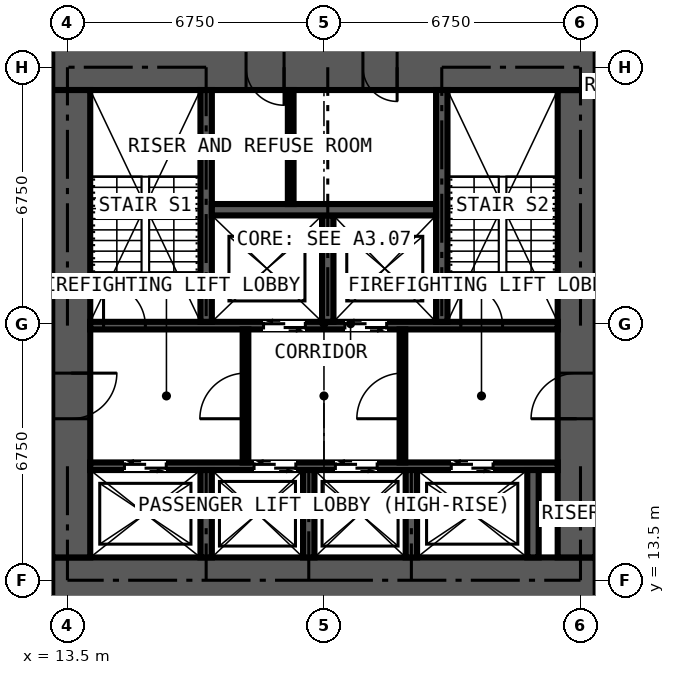
"""IFC4 building model, lengths in metres.
Left out: names, types, materials, properties, quantities, classifications, styles, units other than length and angle.
Written with IfcOpenShell. Run it as: python <this file> out.ifc"""

import sys

from ifc_helpers import new_model, si_unit, direction, frame, frame_2d, origin, place, context, subcontext, project, spatial, rectangle, extrude, element, fill, save


model = new_model("IFC4")
c1 = context("Model", 3, precision=1e-05, world=origin(), true_north=direction((0.0, 1.0)))
c2 = subcontext(c1, "Body", "Model", "MODEL_VIEW")
j1 = project(units=[si_unit("LENGTHUNIT", "METRE"), si_unit("PLANEANGLEUNIT", "RADIAN")], contexts=[c1])
p1 = place(None, origin())
s1 = spatial("IfcSite", under=j1, at=p1, CompositionType="ELEMENT")
p2 = place(p1, origin())
s2 = spatial("IfcBuilding", under=s1, at=p2, CompositionType="ELEMENT")
p3 = place(p2, frame((0.0, 0.0, 181.8)))
s3 = spatial("IfcBuildingStorey", under=s2, at=p3, CompositionType="ELEMENT", Elevation=181.8)
p4 = place(p3, frame((13.1, 13.5, 0.0), z_axis=(0.0, 0.0, 1.0), x_axis=(1.0, 0.0, 0.0)))
e1 = element("IfcWall", 1, at=p4, inside=s3, PredefinedType="SHEAR", context=c2, shape_type="SweptSolid", body=[
    extrude(rectangle(XDim=14.3, YDim=1.2, at=frame_2d((7.15, 0.0))), origin(), (0.0, 0.0, 1.0), 3.6),
])
p5 = place(p3, frame((26.9, 14.1, 0.0), z_axis=(0.0, 0.0, 1.0), x_axis=(0.0, 1.0, 0.0)))
e2 = element("IfcWall", 2, at=p5, inside=s3, PredefinedType="SHEAR", context=c2, shape_type="SweptSolid", body=[
    extrude(rectangle(XDim=12.3, YDim=1.0, at=frame_2d((6.15, 0.0))), origin(), (0.0, 0.0, 1.0), 3.6),
])
p6 = place(p5, frame((3.65, 0.0, 0.0)))
e3 = element("IfcOpeningElement", 3, at=p6, cuts=e2, PredefinedType="OPENING", context=c2, shape_type="SweptSolid", body=[
    extrude(rectangle(XDim=1.2, YDim=2.2, at=frame_2d((0.6, 1.1))), frame((0.0, 0.51, 0.0), z_axis=(0.0, -1.0, 0.0), x_axis=(1.0, 0.0, 0.0)), (0.0, 0.0, 1.0), 1.02),
])
p7 = place(p3, frame((27.4, 27.0, 0.0), z_axis=(0.0, 0.0, 1.0), x_axis=(-1.0, 0.0, 0.0)))
e4 = element("IfcWall", 4, at=p7, inside=s3, PredefinedType="SHEAR", context=c2, shape_type="SweptSolid", body=[
    extrude(rectangle(XDim=14.3, YDim=1.2, at=frame_2d((7.15, 0.0))), origin(), (0.0, 0.0, 1.0), 3.6),
])
p8 = place(p7, frame((5.225, 0.0, 0.0)))
e5 = element("IfcOpeningElement", 5, at=p8, cuts=e4, PredefinedType="OPENING", context=c2, shape_type="SweptSolid", body=[
    extrude(rectangle(XDim=0.9, YDim=2.2, at=frame_2d((0.45, 1.1))), frame((0.0, 0.61, 0.0), z_axis=(0.0, -1.0, 0.0), x_axis=(1.0, 0.0, 0.0)), (0.0, 0.0, 1.0), 1.22),
])
p9 = place(p7, frame((8.2, 0.0, 0.0)))
e6 = element("IfcOpeningElement", 6, at=p9, cuts=e4, PredefinedType="OPENING", context=c2, shape_type="SweptSolid", body=[
    extrude(rectangle(XDim=1.0, YDim=2.2, at=frame_2d((0.5, 1.1))), frame((0.0, 0.61, 0.0), z_axis=(0.0, -1.0, 0.0), x_axis=(1.0, 0.0, 0.0)), (0.0, 0.0, 1.0), 1.22),
])
p10 = place(p3, frame((13.6, 26.4, 0.0), z_axis=(0.0, 0.0, 1.0), x_axis=(0.0, -1.0, 0.0)))
e7 = element("IfcWall", 7, at=p10, inside=s3, PredefinedType="SHEAR", context=c2, shape_type="SweptSolid", body=[
    extrude(rectangle(XDim=12.3, YDim=1.0, at=frame_2d((6.15, 0.0))), origin(), (0.0, 0.0, 1.0), 3.6),
])
p11 = place(p10, frame((7.45, 0.0, 0.0)))
e8 = element("IfcOpeningElement", 8, at=p11, cuts=e7, PredefinedType="OPENING", context=c2, shape_type="SweptSolid", body=[
    extrude(rectangle(XDim=1.2, YDim=2.2, at=frame_2d((0.6, 1.1))), frame((0.0, 0.51, 0.0), z_axis=(0.0, -1.0, 0.0), x_axis=(1.0, 0.0, 0.0)), (0.0, 0.0, 1.0), 1.02),
])
p12 = place(p3, frame((14.1, 16.5, 0.0), z_axis=(0.0, 0.0, 1.0), x_axis=(1.0, 0.0, 0.0)))
e9 = element("IfcWall", 9, at=p12, inside=s3, PredefinedType="SHEAR", context=c2, shape_type="SweptSolid", body=[
    extrude(rectangle(XDim=12.3, YDim=0.2, at=frame_2d((6.15, 0.0))), origin(), (0.0, 0.0, 1.0), 3.6),
])
p13 = place(p12, frame((0.9, 0.0, 0.0)))
e10 = element("IfcOpeningElement", 10, at=p13, cuts=e9, PredefinedType="OPENING", context=c2, shape_type="SweptSolid", body=[
    extrude(rectangle(XDim=1.1, YDim=2.2, at=frame_2d((0.55, 1.1))), frame((0.0, 0.11, 0.0), z_axis=(0.0, -1.0, 0.0), x_axis=(1.0, 0.0, 0.0)), (0.0, 0.0, 1.0), 0.22),
])
p14 = place(p12, frame((4.31, 0.0, 0.0)))
e11 = element("IfcOpeningElement", 11, at=p14, cuts=e9, PredefinedType="OPENING", context=c2, shape_type="SweptSolid", body=[
    extrude(rectangle(XDim=1.1, YDim=2.2, at=frame_2d((0.55, 1.1))), frame((0.0, 0.11, 0.0), z_axis=(0.0, -1.0, 0.0), x_axis=(1.0, 0.0, 0.0)), (0.0, 0.0, 1.0), 0.22),
])
p15 = place(p12, frame((6.45, 0.0, 0.0)))
e12 = element("IfcOpeningElement", 12, at=p15, cuts=e9, PredefinedType="OPENING", context=c2, shape_type="SweptSolid", body=[
    extrude(rectangle(XDim=1.1, YDim=2.2, at=frame_2d((0.55, 1.1))), frame((0.0, 0.11, 0.0), z_axis=(0.0, -1.0, 0.0), x_axis=(1.0, 0.0, 0.0)), (0.0, 0.0, 1.0), 0.22),
])
p16 = place(p12, frame((9.5, 0.0, 0.0)))
e13 = element("IfcOpeningElement", 13, at=p16, cuts=e9, PredefinedType="OPENING", context=c2, shape_type="SweptSolid", body=[
    extrude(rectangle(XDim=1.1, YDim=2.2, at=frame_2d((0.55, 1.1))), frame((0.0, 0.11, 0.0), z_axis=(0.0, -1.0, 0.0), x_axis=(1.0, 0.0, 0.0)), (0.0, 0.0, 1.0), 0.22),
])
p17 = place(p3, frame((14.1, 20.2, 0.0), z_axis=(0.0, 0.0, 1.0), x_axis=(1.0, 0.0, 0.0)))
e14 = element("IfcWall", 14, at=p17, inside=s3, PredefinedType="SHEAR", context=c2, shape_type="SweptSolid", body=[
    extrude(rectangle(XDim=12.3, YDim=0.2, at=frame_2d((6.15, 0.0))), origin(), (0.0, 0.0, 1.0), 3.6),
])
p18 = place(p17, frame((4.56, 0.0, 0.0)))
e15 = element("IfcOpeningElement", 15, at=p18, cuts=e14, PredefinedType="OPENING", context=c2, shape_type="SweptSolid", body=[
    extrude(rectangle(XDim=1.1, YDim=2.2, at=frame_2d((0.55, 1.1))), frame((0.0, 0.11, 0.0), z_axis=(0.0, -1.0, 0.0), x_axis=(1.0, 0.0, 0.0)), (0.0, 0.0, 1.0), 0.22),
])
p19 = place(p17, frame((6.7, 0.0, 0.0)))
e16 = element("IfcOpeningElement", 16, at=p19, cuts=e14, PredefinedType="OPENING", context=c2, shape_type="SweptSolid", body=[
    extrude(rectangle(XDim=1.1, YDim=2.2, at=frame_2d((0.55, 1.1))), frame((0.0, 0.11, 0.0), z_axis=(0.0, -1.0, 0.0), x_axis=(1.0, 0.0, 0.0)), (0.0, 0.0, 1.0), 0.22),
])
p20 = place(p17, frame((0.35, 0.0, 0.0)))
e17 = element("IfcOpeningElement", 17, at=p20, cuts=e14, PredefinedType="OPENING", context=c2, shape_type="SweptSolid", body=[
    extrude(rectangle(XDim=1.1, YDim=2.2, at=frame_2d((0.55, 1.1))), frame((0.0, 0.11, 0.0), z_axis=(0.0, -1.0, 0.0), x_axis=(1.0, 0.0, 0.0)), (0.0, 0.0, 1.0), 0.22),
])
p21 = place(p17, frame((9.75, 0.0, 0.0)))
e18 = element("IfcOpeningElement", 18, at=p21, cuts=e14, PredefinedType="OPENING", context=c2, shape_type="SweptSolid", body=[
    extrude(rectangle(XDim=1.1, YDim=2.2, at=frame_2d((0.55, 1.1))), frame((0.0, 0.11, 0.0), z_axis=(0.0, -1.0, 0.0), x_axis=(1.0, 0.0, 0.0)), (0.0, 0.0, 1.0), 0.22),
])
for number, where, z_axis, x_axis in (
    (19, (17.15, 20.3, 0.0), (0.0, 0.0, 1.0), (0.0, 1.0, 0.0)),
    (20, (23.35, 20.3, 0.0), (0.0, 0.0, 1.0), (0.0, 1.0, 0.0)),
):
    element("IfcWall", number, at=place(p3, frame(where, z_axis=z_axis, x_axis=x_axis)), inside=s3, PredefinedType="SHEAR", context=c2, shape_type="SweptSolid", body=[
        extrude(rectangle(XDim=6.1, YDim=0.3, at=frame_2d((3.05, 0.0))), origin(), (0.0, 0.0, 1.0), 3.6),
    ])
p22 = place(p3, frame((20.35, 20.3, 0.0), z_axis=(0.0, 0.0, 1.0), x_axis=(0.0, 1.0, 0.0)))
e21 = element("IfcWall", 21, at=p22, inside=s3, PredefinedType="SHEAR", context=c2, shape_type="SweptSolid", body=[
    extrude(rectangle(XDim=2.8, YDim=0.3, at=frame_2d((1.4, 0.0))), origin(), (0.0, 0.0, 1.0), 3.6),
])
p23 = place(p3, frame((17.3, 23.25, 0.0), z_axis=(0.0, 0.0, 1.0), x_axis=(1.0, 0.0, 0.0)))
e22 = element("IfcWall", 22, at=p23, inside=s3, PredefinedType="SHEAR", context=c2, shape_type="SweptSolid", body=[
    extrude(rectangle(XDim=5.9, YDim=0.3, at=frame_2d((2.95, 0.0))), origin(), (0.0, 0.0, 1.0), 3.6),
])
for number, where, z_axis, x_axis in (
    (23, (17.15, 14.1, 0.0), (0.0, 0.0, 1.0), (0.0, 1.0, 0.0)),
    (24, (19.85, 14.1, 0.0), (0.0, 0.0, 1.0), (0.0, 1.0, 0.0)),
    (25, (22.55, 14.1, 0.0), (0.0, 0.0, 1.0), (0.0, 1.0, 0.0)),
    (26, (25.75, 14.1, 0.0), (0.0, 0.0, 1.0), (0.0, 1.0, 0.0)),
):
    element("IfcWall", number, at=place(p3, frame(where, z_axis=z_axis, x_axis=x_axis)), inside=s3, PredefinedType="SHEAR", context=c2, shape_type="SweptSolid", body=[
        extrude(rectangle(XDim=2.3, YDim=0.3, at=frame_2d((1.15, 0.0))), origin(), (0.0, 0.0, 1.0), 3.6),
    ])
p24 = place(p3, frame((18.185, 16.6, 0.0), z_axis=(0.0, 0.0, 1.0), x_axis=(0.0, 1.0, 0.0)))
e27 = element("IfcWall", 27, at=p24, inside=s3, PredefinedType="PARTITIONING", context=c2, shape_type="SweptSolid", body=[
    extrude(rectangle(XDim=3.5, YDim=0.15, at=frame_2d((1.75, 0.0))), origin(), (0.0, 0.0, 1.0), 3.375),
])
p25 = place(p24, frame((1.15, 0.0, 0.0)))
e28 = element("IfcOpeningElement", 28, at=p25, cuts=e27, PredefinedType="OPENING", context=c2, shape_type="SweptSolid", body=[
    extrude(rectangle(XDim=1.2, YDim=2.2, at=frame_2d((0.6, 1.1))), frame((0.0, 0.085, 0.0), z_axis=(0.0, -1.0, 0.0), x_axis=(1.0, 0.0, 0.0)), (0.0, 0.0, 1.0), 0.17),
])
p26 = place(p3, frame((22.315, 16.6, 0.0), z_axis=(0.0, 0.0, 1.0), x_axis=(0.0, 1.0, 0.0)))
e29 = element("IfcWall", 29, at=p26, inside=s3, PredefinedType="PARTITIONING", context=c2, shape_type="SweptSolid", body=[
    extrude(rectangle(XDim=3.5, YDim=0.15, at=frame_2d((1.75, 0.0))), origin(), (0.0, 0.0, 1.0), 3.375),
])
p27 = place(p26, frame((1.15, 0.0, 0.0)))
e30 = element("IfcOpeningElement", 30, at=p27, cuts=e29, PredefinedType="OPENING", context=c2, shape_type="SweptSolid", body=[
    extrude(rectangle(XDim=1.2, YDim=2.2, at=frame_2d((0.6, 1.1))), frame((0.0, 0.085, 0.0), z_axis=(0.0, -1.0, 0.0), x_axis=(1.0, 0.0, 0.0)), (0.0, 0.0, 1.0), 0.17),
])
p28 = place(p3, frame((19.375, 23.4, 0.0), z_axis=(0.0, 0.0, 1.0), x_axis=(0.0, 1.0, 0.0)))
e31 = element("IfcWall", 31, at=p28, inside=s3, PredefinedType="PARTITIONING", context=c2, shape_type="SweptSolid", body=[
    extrude(rectangle(XDim=3.0, YDim=0.15, at=frame_2d((1.5, 0.0))), origin(), (0.0, 0.0, 1.0), 3.375),
])
p29 = place(p13, origin())
e32 = element("IfcDoor", 32, at=p29, inside=s3, OperationType="DOUBLE_DOOR_SLIDING", PredefinedType="DOOR", context=c2, shape_type="SweptSolid", body=[
    extrude(rectangle(XDim=1.1, YDim=2.2, at=frame_2d((0.55, 1.1))), frame((0.0, 0.025, 0.0), z_axis=(0.0, -1.0, 0.0), x_axis=(1.0, 0.0, 0.0)), (0.0, 0.0, 1.0), 0.05),
])
fill(e10, e32)
p30 = place(p14, origin())
e33 = element("IfcDoor", 33, at=p30, inside=s3, OperationType="DOUBLE_DOOR_SLIDING", PredefinedType="DOOR", context=c2, shape_type="SweptSolid", body=[
    extrude(rectangle(XDim=1.1, YDim=2.2, at=frame_2d((0.55, 1.1))), frame((0.0, 0.025, 0.0), z_axis=(0.0, -1.0, 0.0), x_axis=(1.0, 0.0, 0.0)), (0.0, 0.0, 1.0), 0.05),
])
fill(e11, e33)
p31 = place(p15, origin())
e34 = element("IfcDoor", 34, at=p31, inside=s3, OperationType="DOUBLE_DOOR_SLIDING", PredefinedType="DOOR", context=c2, shape_type="SweptSolid", body=[
    extrude(rectangle(XDim=1.1, YDim=2.2, at=frame_2d((0.55, 1.1))), frame((0.0, 0.025, 0.0), z_axis=(0.0, -1.0, 0.0), x_axis=(1.0, 0.0, 0.0)), (0.0, 0.0, 1.0), 0.05),
])
fill(e12, e34)
p32 = place(p16, origin())
e35 = element("IfcDoor", 35, at=p32, inside=s3, OperationType="DOUBLE_DOOR_SLIDING", PredefinedType="DOOR", context=c2, shape_type="SweptSolid", body=[
    extrude(rectangle(XDim=1.1, YDim=2.2, at=frame_2d((0.55, 1.1))), frame((0.0, 0.025, 0.0), z_axis=(0.0, -1.0, 0.0), x_axis=(1.0, 0.0, 0.0)), (0.0, 0.0, 1.0), 0.05),
])
fill(e13, e35)
p33 = place(p18, origin())
e36 = element("IfcDoor", 36, at=p33, inside=s3, OperationType="DOUBLE_DOOR_SLIDING", PredefinedType="DOOR", context=c2, shape_type="SweptSolid", body=[
    extrude(rectangle(XDim=1.1, YDim=2.2, at=frame_2d((0.55, 1.1))), frame((0.0, 0.025, 0.0), z_axis=(0.0, -1.0, 0.0), x_axis=(1.0, 0.0, 0.0)), (0.0, 0.0, 1.0), 0.05),
])
fill(e15, e36)
p34 = place(p19, origin())
e37 = element("IfcDoor", 37, at=p34, inside=s3, OperationType="DOUBLE_DOOR_SLIDING", PredefinedType="DOOR", context=c2, shape_type="SweptSolid", body=[
    extrude(rectangle(XDim=1.1, YDim=2.2, at=frame_2d((0.55, 1.1))), frame((0.0, 0.025, 0.0), z_axis=(0.0, -1.0, 0.0), x_axis=(1.0, 0.0, 0.0)), (0.0, 0.0, 1.0), 0.05),
])
fill(e16, e37)
p35 = place(p11, origin())
e38 = element("IfcDoor", 38, at=p35, inside=s3, OperationType="DOUBLE_DOOR_SINGLE_SWING", PredefinedType="DOOR", context=c2, shape_type="SweptSolid", body=[
    extrude(rectangle(XDim=1.2, YDim=2.2, at=frame_2d((0.6, 1.1))), frame((0.0, 0.025, 0.0), z_axis=(0.0, -1.0, 0.0), x_axis=(1.0, 0.0, 0.0)), (0.0, 0.0, 1.0), 0.05),
])
fill(e8, e38)
p36 = place(p6, origin())
e39 = element("IfcDoor", 39, at=p36, inside=s3, OperationType="DOUBLE_DOOR_SINGLE_SWING", PredefinedType="DOOR", context=c2, shape_type="SweptSolid", body=[
    extrude(rectangle(XDim=1.2, YDim=2.2, at=frame_2d((0.6, 1.1))), frame((0.0, 0.025, 0.0), z_axis=(0.0, -1.0, 0.0), x_axis=(1.0, 0.0, 0.0)), (0.0, 0.0, 1.0), 0.05),
])
fill(e3, e39)
p37 = place(p25, origin())
e40 = element("IfcDoor", 40, at=p37, inside=s3, OperationType="DOUBLE_DOOR_SINGLE_SWING", PredefinedType="DOOR", context=c2, shape_type="SweptSolid", body=[
    extrude(rectangle(XDim=1.2, YDim=2.2, at=frame_2d((0.6, 1.1))), frame((0.0, 0.025, 0.0), z_axis=(0.0, -1.0, 0.0), x_axis=(1.0, 0.0, 0.0)), (0.0, 0.0, 1.0), 0.05),
])
fill(e28, e40)
p38 = place(p27, origin())
e41 = element("IfcDoor", 41, at=p38, inside=s3, OperationType="DOUBLE_DOOR_SINGLE_SWING", PredefinedType="DOOR", context=c2, shape_type="SweptSolid", body=[
    extrude(rectangle(XDim=1.2, YDim=2.2, at=frame_2d((0.6, 1.1))), frame((0.0, 0.025, 0.0), z_axis=(0.0, -1.0, 0.0), x_axis=(1.0, 0.0, 0.0)), (0.0, 0.0, 1.0), 0.05),
])
fill(e30, e41)
p39 = place(p8, origin())
e42 = element("IfcDoor", 42, at=p39, inside=s3, OperationType="SINGLE_SWING_LEFT", PredefinedType="DOOR", context=c2, shape_type="SweptSolid", body=[
    extrude(rectangle(XDim=0.9, YDim=2.2, at=frame_2d((0.45, 1.1))), frame((0.0, 0.4, 0.0), z_axis=(0.0, -1.0, 0.0), x_axis=(1.0, 0.0, 0.0)), (0.0, 0.0, 1.0), 0.8),
])
fill(e5, e42)
p40 = place(p9, origin())
e43 = element("IfcDoor", 43, at=p40, inside=s3, OperationType="SINGLE_SWING_LEFT", PredefinedType="DOOR", context=c2, shape_type="SweptSolid", body=[
    extrude(rectangle(XDim=1.0, YDim=2.2, at=frame_2d((0.5, 1.1))), frame((0.0, 0.025, 0.0), z_axis=(0.0, -1.0, 0.0), x_axis=(1.0, 0.0, 0.0)), (0.0, 0.0, 1.0), 0.05),
])
fill(e6, e43)
p41 = place(p20, origin())
e44 = element("IfcDoor", 44, at=p41, inside=s3, OperationType="SINGLE_SWING_LEFT", PredefinedType="DOOR", context=c2, shape_type="SweptSolid", body=[
    extrude(rectangle(XDim=1.1, YDim=2.2, at=frame_2d((0.55, 1.1))), frame((0.0, 0.025, 0.0), z_axis=(0.0, -1.0, 0.0), x_axis=(1.0, 0.0, 0.0)), (0.0, 0.0, 1.0), 0.05),
])
fill(e17, e44)
p42 = place(p21, origin())
e45 = element("IfcDoor", 45, at=p42, inside=s3, OperationType="SINGLE_SWING_LEFT", PredefinedType="DOOR", context=c2, shape_type="SweptSolid", body=[
    extrude(rectangle(XDim=1.1, YDim=2.2, at=frame_2d((0.55, 1.1))), frame((0.0, 0.025, 0.0), z_axis=(0.0, -1.0, 0.0), x_axis=(1.0, 0.0, 0.0)), (0.0, 0.0, 1.0), 0.05),
])
fill(e18, e45)
save(model, sys.argv[1])
